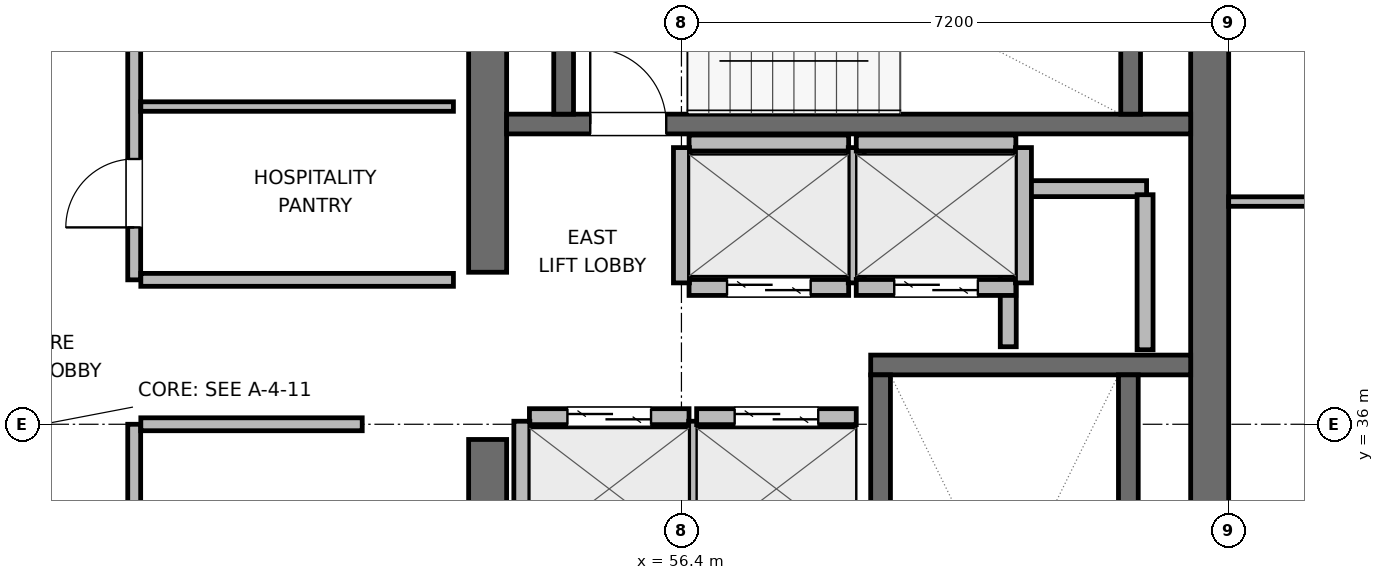
"""IFC4 building model, lengths in metres.
Left out: names, types, materials, properties, quantities, classifications, styles, units other than length and angle.
Written with IfcOpenShell. Run it as: python <this file> out.ifc"""

import sys

from ifc_helpers import new_model, si_unit, direction, frame, frame_2d, origin, place, context, subcontext, project, spatial, rectangle, extrude, element, fill, save


model = new_model("IFC4")
c1 = context("Model", 3, precision=1e-05, world=origin(), true_north=direction((0.0, 1.0)))
c2 = subcontext(c1, "Body", "Model", "MODEL_VIEW")
j1 = project(units=[si_unit("LENGTHUNIT", "METRE"), si_unit("PLANEANGLEUNIT", "RADIAN")], contexts=[c1])
p1 = place(None, origin())
s1 = spatial("IfcSite", under=j1, at=p1, CompositionType="ELEMENT")
p2 = place(p1, origin())
s2 = spatial("IfcBuilding", under=s1, at=p2, CompositionType="ELEMENT")
p3 = place(p2, frame((0.0, 0.0, 278.4)))
s3 = spatial("IfcBuildingStorey", under=s2, at=p3, CompositionType="ELEMENT", Elevation=278.4)
p4 = place(p3, frame((53.85, 27.85, 0.0), z_axis=(0.0, 0.0, 1.0), x_axis=(0.0, 1.0, 0.0)))
e1 = element("IfcWall", 1, at=p4, inside=s3, PredefinedType="SHEAR", context=c2, shape_type="SweptSolid", body=[
    extrude(rectangle(XDim=7.95, YDim=0.5, at=frame_2d((3.975, 0.0))), origin(), (0.0, 0.0, 1.0), 3.9),
])
p5 = place(p3, frame((53.85, 38.0, 0.0), z_axis=(0.0, 0.0, 1.0), x_axis=(0.0, 1.0, 0.0)))
e2 = element("IfcWall", 2, at=p5, inside=s3, PredefinedType="SHEAR", context=c2, shape_type="SweptSolid", body=[
    extrude(rectangle(XDim=6.15, YDim=0.5, at=frame_2d((3.075, 0.0))), origin(), (0.0, 0.0, 1.0), 3.9),
])
p6 = place(p3, frame((63.35, 27.6, 0.0), z_axis=(0.0, 0.0, 1.0), x_axis=(0.0, 1.0, 0.0)))
e3 = element("IfcWall", 3, at=p6, inside=s3, PredefinedType="SHEAR", context=c2, shape_type="SweptSolid", body=[
    extrude(rectangle(XDim=16.8, YDim=0.5, at=frame_2d((8.4, 0.0))), origin(), (0.0, 0.0, 1.0), 3.9),
])
p7 = place(p3, frame((58.89, 36.78, 0.0), z_axis=(0.0, 0.0, 1.0), x_axis=(1.0, 0.0, 0.0)))
e4 = element("IfcWall", 4, at=p7, inside=s3, PredefinedType="SHEAR", context=c2, shape_type="SweptSolid", body=[
    extrude(rectangle(XDim=4.21, YDim=0.26, at=frame_2d((2.105, 0.0))), origin(), (0.0, 0.0, 1.0), 3.9),
])
p8 = place(p3, frame((59.02, 29.05, 0.0), z_axis=(0.0, 0.0, 1.0), x_axis=(0.0, 1.0, 0.0)))
e5 = element("IfcWall", 5, at=p8, inside=s3, PredefinedType="SHEAR", context=c2, shape_type="SweptSolid", body=[
    extrude(rectangle(XDim=7.6, YDim=0.26, at=frame_2d((3.8, 0.0))), origin(), (0.0, 0.0, 1.0), 3.9),
])
p9 = place(p8, frame((0.3, 0.0, 0.0)))
e6 = element("IfcOpeningElement", 6, at=p9, cuts=e5, PredefinedType="OPENING", context=c2, shape_type="SweptSolid", body=[
    extrude(rectangle(XDim=1.0, YDim=2.04, at=frame_2d((0.5, 1.02))), frame((0.0, 0.14, 0.0), z_axis=(0.0, -1.0, 0.0), x_axis=(1.0, 0.0, 0.0)), (0.0, 0.0, 1.0), 0.28),
])
p10 = place(p3, frame((62.28, 29.05, 0.0), z_axis=(0.0, 0.0, 1.0), x_axis=(0.0, 1.0, 0.0)))
e7 = element("IfcWall", 7, at=p10, inside=s3, PredefinedType="SHEAR", context=c2, shape_type="SweptSolid", body=[
    extrude(rectangle(XDim=7.6, YDim=0.26, at=frame_2d((3.8, 0.0))), origin(), (0.0, 0.0, 1.0), 3.9),
])
p11 = place(p3, frame((54.1, 39.95, 0.0), z_axis=(0.0, 0.0, 1.0), x_axis=(1.0, 0.0, 0.0)))
e8 = element("IfcWall", 8, at=p11, inside=s3, PredefinedType="SHEAR", context=c2, shape_type="SweptSolid", body=[
    extrude(rectangle(XDim=9.0, YDim=0.26, at=frame_2d((4.5, 0.0))), origin(), (0.0, 0.0, 1.0), 3.9),
])
p12 = place(p11, frame((1.1, 0.0, 0.0)))
e9 = element("IfcOpeningElement", 9, at=p12, cuts=e8, PredefinedType="OPENING", context=c2, shape_type="SweptSolid", body=[
    extrude(rectangle(XDim=1.0, YDim=2.04, at=frame_2d((0.5, 1.02))), frame((0.0, 0.14, 0.0), z_axis=(0.0, -1.0, 0.0), x_axis=(1.0, 0.0, 0.0)), (0.0, 0.0, 1.0), 0.28),
])
for number, where, z_axis, x_axis in (
    (10, (54.85, 40.08, 0.0), (0.0, 0.0, 1.0), (0.0, 1.0, 0.0)),
    (11, (62.31, 40.08, 0.0), (0.0, 0.0, 1.0), (0.0, 1.0, 0.0)),
):
    element("IfcWall", number, at=place(p3, frame(where, z_axis=z_axis, x_axis=x_axis)), inside=s3, PredefinedType="SHEAR", context=c2, shape_type="SweptSolid", body=[
        extrude(rectangle(XDim=2.94, YDim=0.26, at=frame_2d((1.47, 0.0))), origin(), (0.0, 0.0, 1.0), 3.9),
    ])
p13 = place(p3, frame((60.72, 39.1, 0.0), z_axis=(0.0, 0.0, 1.0), x_axis=(1.0, 0.0, 0.0)))
e12 = element("IfcWall", 12, at=p13, inside=s3, PredefinedType="PARTITIONING", context=c2, shape_type="SweptSolid", body=[
    extrude(rectangle(XDim=1.8, YDim=0.21, at=frame_2d((0.9, 0.0))), origin(), (0.0, 0.0, 1.0), 3.6),
])
p14 = place(p3, frame((60.7, 37.02, 0.0), z_axis=(0.0, 0.0, 1.0), x_axis=(0.0, 1.0, 0.0)))
e13 = element("IfcWall", 13, at=p14, inside=s3, PredefinedType="PARTITIONING", context=c2, shape_type="SweptSolid", body=[
    extrude(rectangle(XDim=1.96, YDim=0.21, at=frame_2d((0.98, 0.0))), origin(), (0.0, 0.0, 1.0), 3.6),
])
p15 = place(p3, frame((62.5, 36.98, 0.0), z_axis=(0.0, 0.0, 1.0), x_axis=(0.0, 1.0, 0.0)))
e14 = element("IfcWall", 14, at=p15, inside=s3, PredefinedType="PARTITIONING", context=c2, shape_type="SweptSolid", body=[
    extrude(rectangle(XDim=2.04, YDim=0.21, at=frame_2d((1.02, 0.0))), origin(), (0.0, 0.0, 1.0), 3.6),
])
p16 = place(p3, frame((54.4, 36.1, 0.0), z_axis=(0.0, 0.0, 1.0), x_axis=(1.0, 0.0, 0.0)))
e15 = element("IfcWall", 15, at=p16, inside=s3, PredefinedType="PARTITIONING", context=c2, shape_type="SweptSolid", body=[
    extrude(rectangle(XDim=2.1, YDim=0.21, at=frame_2d((1.05, 0.0))), origin(), (0.0, 0.0, 1.0), 3.6),
])
p17 = place(p16, frame((0.5, 0.0, 0.0)))
e16 = element("IfcOpeningElement", 16, at=p17, cuts=e15, PredefinedType="OPENING", context=c2, shape_type="SweptSolid", body=[
    extrude(rectangle(XDim=1.1, YDim=2.04, at=frame_2d((0.55, 1.02))), frame((0.0, 0.115, 0.0), z_axis=(0.0, -1.0, 0.0), x_axis=(1.0, 0.0, 0.0)), (0.0, 0.0, 1.0), 0.23),
])
for number, where, z_axis, x_axis in (
    (17, (54.3, 34.26, 0.0), (0.0, 0.0, 1.0), (0.0, 1.0, 0.0)),
    (18, (56.6, 34.26, 0.0), (0.0, 0.0, 1.0), (0.0, 1.0, 0.0)),
):
    element("IfcWall", number, at=place(p3, frame(where, z_axis=z_axis, x_axis=x_axis)), inside=s3, PredefinedType="PARTITIONING", context=c2, shape_type="SweptSolid", body=[
        extrude(rectangle(XDim=1.78, YDim=0.21, at=frame_2d((0.89, 0.0))), origin(), (0.0, 0.0, 1.0), 3.6),
    ])
p18 = place(p3, frame((56.6, 36.1, 0.0), z_axis=(0.0, 0.0, 1.0), x_axis=(1.0, 0.0, 0.0)))
e19 = element("IfcWall", 19, at=p18, inside=s3, PredefinedType="PARTITIONING", context=c2, shape_type="SweptSolid", body=[
    extrude(rectangle(XDim=2.1, YDim=0.21, at=frame_2d((1.05, 0.0))), origin(), (0.0, 0.0, 1.0), 3.6),
])
p19 = place(p18, frame((0.5, 0.0, 0.0)))
e20 = element("IfcOpeningElement", 20, at=p19, cuts=e19, PredefinedType="OPENING", context=c2, shape_type="SweptSolid", body=[
    extrude(rectangle(XDim=1.1, YDim=2.04, at=frame_2d((0.55, 1.02))), frame((0.0, 0.115, 0.0), z_axis=(0.0, -1.0, 0.0), x_axis=(1.0, 0.0, 0.0)), (0.0, 0.0, 1.0), 0.23),
])
p20 = place(p3, frame((56.5, 37.8, 0.0), z_axis=(0.0, 0.0, 1.0), x_axis=(1.0, 0.0, 0.0)))
e21 = element("IfcWall", 21, at=p20, inside=s3, PredefinedType="PARTITIONING", context=c2, shape_type="SweptSolid", body=[
    extrude(rectangle(XDim=2.1, YDim=0.21, at=frame_2d((1.05, 0.0))), origin(), (0.0, 0.0, 1.0), 3.6),
])
p21 = place(p20, frame((0.5, 0.0, 0.0)))
e22 = element("IfcOpeningElement", 22, at=p21, cuts=e21, PredefinedType="OPENING", context=c2, shape_type="SweptSolid", body=[
    extrude(rectangle(XDim=1.1, YDim=2.04, at=frame_2d((0.55, 1.02))), frame((0.0, 0.115, 0.0), z_axis=(0.0, -1.0, 0.0), x_axis=(1.0, 0.0, 0.0)), (0.0, 0.0, 1.0), 0.23),
])
p22 = place(p3, frame((56.5, 39.7, 0.0), z_axis=(0.0, 0.0, 1.0), x_axis=(1.0, 0.0, 0.0)))
e23 = element("IfcWall", 23, at=p22, inside=s3, PredefinedType="PARTITIONING", context=c2, shape_type="SweptSolid", body=[
    extrude(rectangle(XDim=2.1, YDim=0.21, at=frame_2d((1.05, 0.0))), origin(), (0.0, 0.0, 1.0), 3.6),
])
for number, where, z_axis, x_axis in (
    (24, (56.4, 37.86, 0.0), (0.0, 0.0, 1.0), (0.0, 1.0, 0.0)),
    (25, (58.7, 37.86, 0.0), (0.0, 0.0, 1.0), (0.0, 1.0, 0.0)),
):
    element("IfcWall", number, at=place(p3, frame(where, z_axis=z_axis, x_axis=x_axis)), inside=s3, PredefinedType="PARTITIONING", context=c2, shape_type="SweptSolid", body=[
        extrude(rectangle(XDim=1.78, YDim=0.21, at=frame_2d((0.89, 0.0))), origin(), (0.0, 0.0, 1.0), 3.6),
    ])
p23 = place(p3, frame((58.7, 37.8, 0.0), z_axis=(0.0, 0.0, 1.0), x_axis=(1.0, 0.0, 0.0)))
e26 = element("IfcWall", 26, at=p23, inside=s3, PredefinedType="PARTITIONING", context=c2, shape_type="SweptSolid", body=[
    extrude(rectangle(XDim=2.1, YDim=0.21, at=frame_2d((1.05, 0.0))), origin(), (0.0, 0.0, 1.0), 3.6),
])
p24 = place(p23, frame((0.5, 0.0, 0.0)))
e27 = element("IfcOpeningElement", 27, at=p24, cuts=e26, PredefinedType="OPENING", context=c2, shape_type="SweptSolid", body=[
    extrude(rectangle(XDim=1.1, YDim=2.04, at=frame_2d((0.55, 1.02))), frame((0.0, 0.115, 0.0), z_axis=(0.0, -1.0, 0.0), x_axis=(1.0, 0.0, 0.0)), (0.0, 0.0, 1.0), 0.23),
])
p25 = place(p3, frame((58.7, 39.7, 0.0), z_axis=(0.0, 0.0, 1.0), x_axis=(1.0, 0.0, 0.0)))
e28 = element("IfcWall", 28, at=p25, inside=s3, PredefinedType="PARTITIONING", context=c2, shape_type="SweptSolid", body=[
    extrude(rectangle(XDim=2.1, YDim=0.21, at=frame_2d((1.05, 0.0))), origin(), (0.0, 0.0, 1.0), 3.6),
])
p26 = place(p3, frame((60.9, 37.86, 0.0), z_axis=(0.0, 0.0, 1.0), x_axis=(0.0, 1.0, 0.0)))
e29 = element("IfcWall", 29, at=p26, inside=s3, PredefinedType="PARTITIONING", context=c2, shape_type="SweptSolid", body=[
    extrude(rectangle(XDim=1.78, YDim=0.21, at=frame_2d((0.89, 0.0))), origin(), (0.0, 0.0, 1.0), 3.6),
])
p27 = place(p3, frame((49.2, 32.6, 0.0), z_axis=(0.0, 0.0, 1.0), x_axis=(0.0, 1.0, 0.0)))
e30 = element("IfcWall", 30, at=p27, inside=s3, PredefinedType="PARTITIONING", context=c2, shape_type="SweptSolid", body=[
    extrude(rectangle(XDim=3.4, YDim=0.17, at=frame_2d((1.7, 0.0))), origin(), (0.0, 0.0, 1.0), 3.6),
])
p28 = place(p27, frame((0.638, 0.0, 0.0)))
e31 = element("IfcOpeningElement", 31, at=p28, cuts=e30, PredefinedType="OPENING", context=c2, shape_type="SweptSolid", body=[
    extrude(rectangle(XDim=0.9, YDim=2.02, at=frame_2d((0.45, 1.01))), frame((0.0, 0.095, 0.0), z_axis=(0.0, -1.0, 0.0), x_axis=(1.0, 0.0, 0.0)), (0.0, 0.0, 1.0), 0.19),
])
p29 = place(p3, frame((49.287, 36.0, 0.0), z_axis=(0.0, 0.0, 1.0), x_axis=(1.0, 0.0, 0.0)))
e32 = element("IfcWall", 32, at=p29, inside=s3, PredefinedType="PARTITIONING", context=c2, shape_type="SweptSolid", body=[
    extrude(rectangle(XDim=2.913, YDim=0.17, at=frame_2d((1.457, 0.0))), origin(), (0.0, 0.0, 1.0), 3.6),
])
p30 = place(p3, frame((49.2, 37.9, 0.0), z_axis=(0.0, 0.0, 1.0), x_axis=(0.0, 1.0, 0.0)))
e33 = element("IfcWall", 33, at=p30, inside=s3, PredefinedType="PARTITIONING", context=c2, shape_type="SweptSolid", body=[
    extrude(rectangle(XDim=6.0, YDim=0.17, at=frame_2d((3.0, 0.0))), origin(), (0.0, 0.0, 1.0), 3.6),
])
p31 = place(p30, frame((0.69, 0.0, 0.0)))
e34 = element("IfcOpeningElement", 34, at=p31, cuts=e33, PredefinedType="OPENING", context=c2, shape_type="SweptSolid", body=[
    extrude(rectangle(XDim=0.9, YDim=2.02, at=frame_2d((0.45, 1.01))), frame((0.0, 0.095, 0.0), z_axis=(0.0, -1.0, 0.0), x_axis=(1.0, 0.0, 0.0)), (0.0, 0.0, 1.0), 0.19),
])
p32 = place(p30, frame((3.69, 0.0, 0.0)))
e35 = element("IfcOpeningElement", 35, at=p32, cuts=e33, PredefinedType="OPENING", context=c2, shape_type="SweptSolid", body=[
    extrude(rectangle(XDim=0.9, YDim=2.02, at=frame_2d((0.45, 1.01))), frame((0.0, 0.095, 0.0), z_axis=(0.0, -1.0, 0.0), x_axis=(1.0, 0.0, 0.0)), (0.0, 0.0, 1.0), 0.19),
])
p33 = place(p3, frame((49.287, 37.9, 0.0), z_axis=(0.0, 0.0, 1.0), x_axis=(1.0, 0.0, 0.0)))
e36 = element("IfcWall", 36, at=p33, inside=s3, PredefinedType="PARTITIONING", context=c2, shape_type="SweptSolid", body=[
    extrude(rectangle(XDim=4.113, YDim=0.17, at=frame_2d((2.056, 0.0))), origin(), (0.0, 0.0, 1.0), 3.6),
])
p34 = place(p3, frame((49.287, 40.18, 0.0), z_axis=(0.0, 0.0, 1.0), x_axis=(1.0, 0.0, 0.0)))
e37 = element("IfcWall", 37, at=p34, inside=s3, PredefinedType="PARTITIONING", context=c2, shape_type="SweptSolid", body=[
    extrude(rectangle(XDim=4.113, YDim=0.125, at=frame_2d((2.056, 0.0))), origin(), (0.0, 0.0, 1.0), 3.6),
])
p35 = place(p3, frame((63.6, 38.93, 0.0), z_axis=(0.0, 0.0, 1.0), x_axis=(1.0, 0.0, 0.0)))
e38 = element("IfcWall", 38, at=p35, inside=s3, PredefinedType="PARTITIONING", context=c2, shape_type="SweptSolid", body=[
    extrude(rectangle(XDim=4.845, YDim=0.125, at=frame_2d((2.422, 0.0))), origin(), (0.0, 0.0, 1.0), 3.6),
])
p36 = place(p35, frame((2.1, 0.0, 0.0)))
e39 = element("IfcOpeningElement", 39, at=p36, cuts=e38, PredefinedType="OPENING", context=c2, shape_type="SweptSolid", body=[
    extrude(rectangle(XDim=0.9, YDim=2.02, at=frame_2d((0.45, 1.01))), frame((0.0, 0.073, 0.0), z_axis=(0.0, -1.0, 0.0), x_axis=(1.0, 0.0, 0.0)), (0.0, 0.0, 1.0), 0.145),
])
p37 = place(p12, origin())
e40 = element("IfcDoor", 40, at=p37, inside=s3, OperationType="SINGLE_SWING_LEFT", PredefinedType="DOOR", context=c2, shape_type="SweptSolid", body=[
    extrude(rectangle(XDim=1.0, YDim=2.04, at=frame_2d((0.5, 1.02))), frame((0.0, 0.025, 0.0), z_axis=(0.0, -1.0, 0.0), x_axis=(1.0, 0.0, 0.0)), (0.0, 0.0, 1.0), 0.05),
])
fill(e9, e40)
p38 = place(p17, origin())
e41 = element("IfcDoor", 41, at=p38, inside=s3, OperationType="DOUBLE_DOOR_SLIDING", PredefinedType="DOOR", context=c2, shape_type="SweptSolid", body=[
    extrude(rectangle(XDim=1.1, YDim=2.04, at=frame_2d((0.55, 1.02))), frame((0.0, 0.025, 0.0), z_axis=(0.0, -1.0, 0.0), x_axis=(1.0, 0.0, 0.0)), (0.0, 0.0, 1.0), 0.05),
])
fill(e16, e41)
p39 = place(p19, origin())
e42 = element("IfcDoor", 42, at=p39, inside=s3, OperationType="DOUBLE_DOOR_SLIDING", PredefinedType="DOOR", context=c2, shape_type="SweptSolid", body=[
    extrude(rectangle(XDim=1.1, YDim=2.04, at=frame_2d((0.55, 1.02))), frame((0.0, 0.025, 0.0), z_axis=(0.0, -1.0, 0.0), x_axis=(1.0, 0.0, 0.0)), (0.0, 0.0, 1.0), 0.05),
])
fill(e20, e42)
p40 = place(p21, origin())
e43 = element("IfcDoor", 43, at=p40, inside=s3, OperationType="DOUBLE_DOOR_SLIDING", PredefinedType="DOOR", context=c2, shape_type="SweptSolid", body=[
    extrude(rectangle(XDim=1.1, YDim=2.04, at=frame_2d((0.55, 1.02))), frame((0.0, 0.025, 0.0), z_axis=(0.0, -1.0, 0.0), x_axis=(1.0, 0.0, 0.0)), (0.0, 0.0, 1.0), 0.05),
])
fill(e22, e43)
p41 = place(p24, origin())
e44 = element("IfcDoor", 44, at=p41, inside=s3, OperationType="DOUBLE_DOOR_SLIDING", PredefinedType="DOOR", context=c2, shape_type="SweptSolid", body=[
    extrude(rectangle(XDim=1.1, YDim=2.04, at=frame_2d((0.55, 1.02))), frame((0.0, 0.025, 0.0), z_axis=(0.0, -1.0, 0.0), x_axis=(1.0, 0.0, 0.0)), (0.0, 0.0, 1.0), 0.05),
])
fill(e27, e44)
p42 = place(p31, origin())
e45 = element("IfcDoor", 45, at=p42, inside=s3, OperationType="SINGLE_SWING_LEFT", PredefinedType="DOOR", context=c2, shape_type="SweptSolid", body=[
    extrude(rectangle(XDim=0.9, YDim=2.02, at=frame_2d((0.45, 1.01))), frame((0.0, 0.025, 0.0), z_axis=(0.0, -1.0, 0.0), x_axis=(1.0, 0.0, 0.0)), (0.0, 0.0, 1.0), 0.05),
])
fill(e34, e45)
save(model, sys.argv[1])
